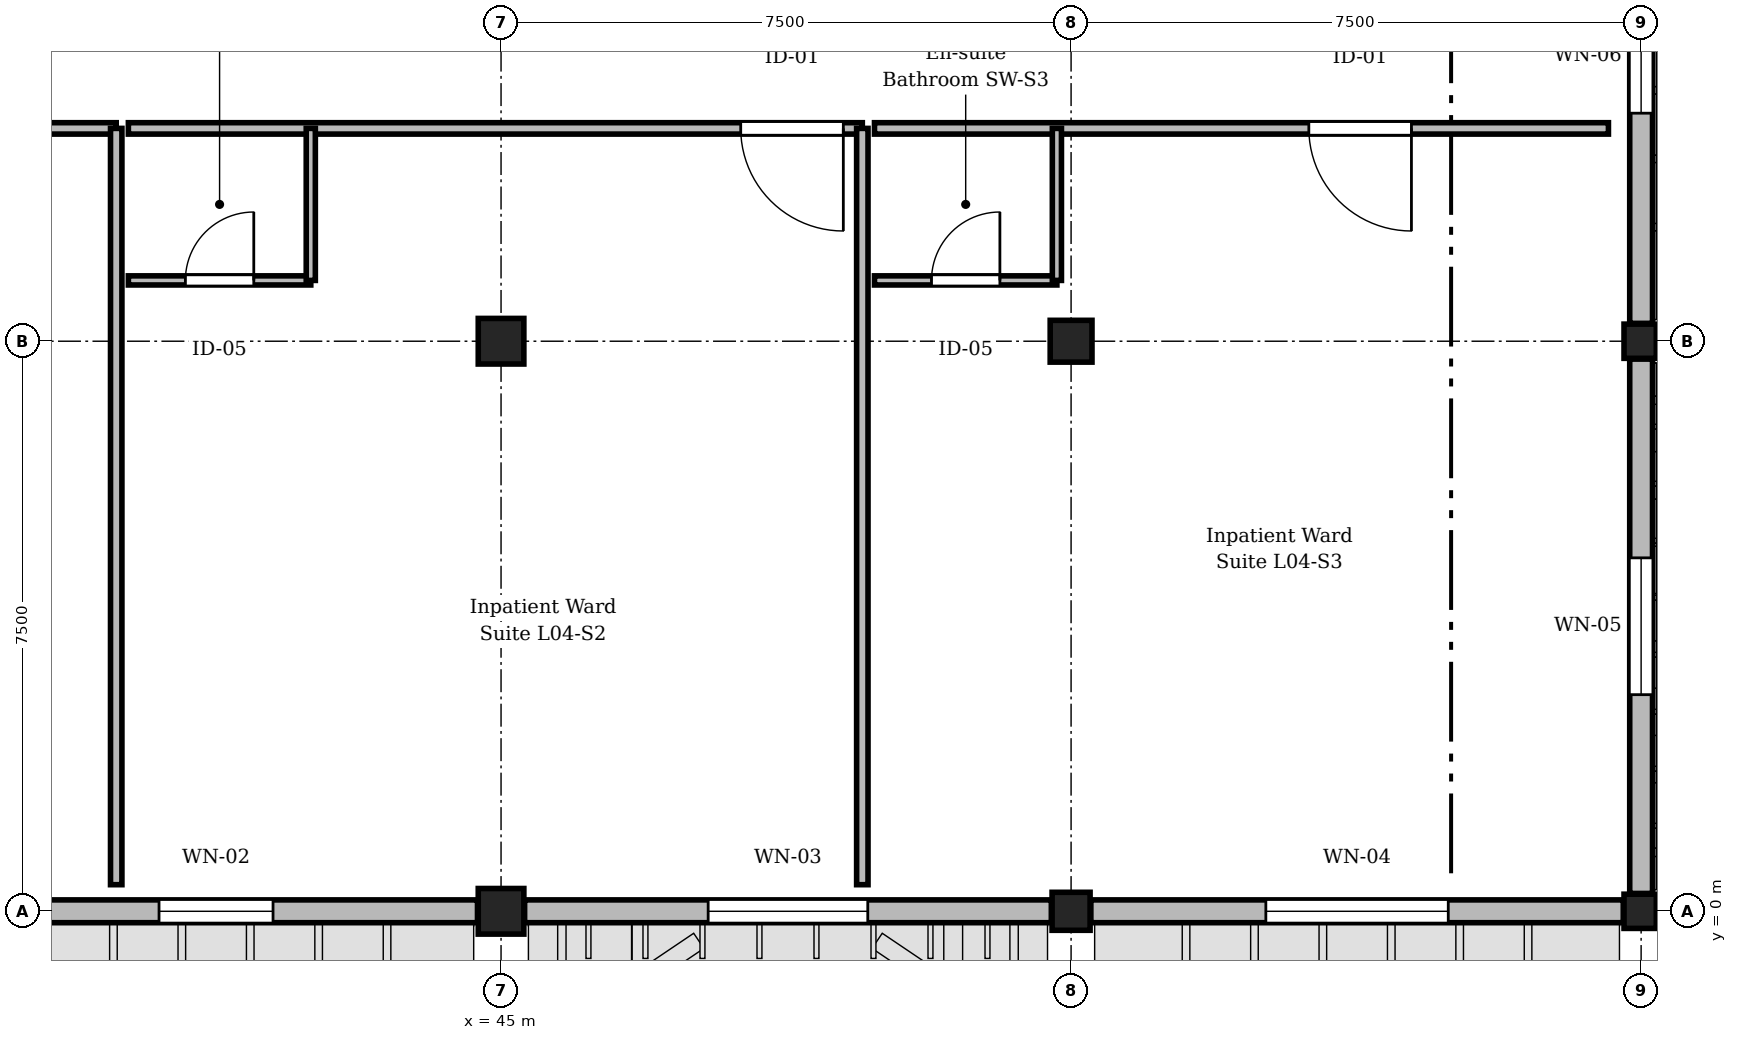
"""IFC4 building model, lengths in metres.
Left out: names, types, materials, properties, quantities, classifications, styles, units other than length and angle.
Written with IfcOpenShell. Run it as: python <this file> out.ifc"""

import sys

from ifc_helpers import new_model, si_unit, direction, frame, frame_2d, origin, origin_2d, place, context, subcontext, project, spatial, rectangle, circle, extrude, element, fill, save


model = new_model("IFC4")
c1 = context("Model", 3, precision=1e-05, world=origin(), true_north=direction((0.0, 1.0)))
c2 = subcontext(c1, "Body", "Model", "MODEL_VIEW")
j1 = project(units=[si_unit("LENGTHUNIT", "METRE"), si_unit("PLANEANGLEUNIT", "RADIAN")], contexts=[c1])
p1 = place(None, origin())
s1 = spatial("IfcSite", under=j1, at=p1, CompositionType="ELEMENT")
p2 = place(p1, origin())
s2 = spatial("IfcBuilding", under=s1, at=p2, CompositionType="ELEMENT")
p3 = place(p2, frame((0.0, 0.0, 17.85)))
s3 = spatial("IfcBuildingStorey", under=s2, at=p3, CompositionType="ELEMENT", Elevation=17.85)
p4 = place(p3, frame((45.0, 0.0, 0.0), z_axis=(0.0, 0.0, 1.0), x_axis=(1.0, 0.0, 0.0)))
e1 = element("IfcColumn", 1, at=p4, inside=s3, PredefinedType="COLUMN", context=c2, shape_type="SweptSolid", body=[
    extrude(circle(Radius=0.3, at=origin_2d()), origin(), (0.0, 0.0, 1.0), 4.05),
])
p5 = place(p3, frame((45.0, 7.5, 0.0), z_axis=(0.0, 0.0, 1.0), x_axis=(1.0, 0.0, 0.0)))
e2 = element("IfcColumn", 2, at=p5, inside=s3, PredefinedType="COLUMN", context=c2, shape_type="SweptSolid", body=[
    extrude(rectangle(XDim=0.6, YDim=0.6, at=origin_2d()), origin(), (0.0, 0.0, 1.0), 4.05),
])
p6 = place(p3, frame((52.5, 0.0, 0.0), z_axis=(0.0, 0.0, 1.0), x_axis=(1.0, 0.0, 0.0)))
e3 = element("IfcColumn", 3, at=p6, inside=s3, PredefinedType="COLUMN", context=c2, shape_type="SweptSolid", body=[
    extrude(rectangle(XDim=0.5, YDim=0.5, at=origin_2d()), origin(), (0.0, 0.0, 1.0), 4.05),
])
p7 = place(p3, frame((52.5, 7.5, 0.0), z_axis=(0.0, 0.0, 1.0), x_axis=(1.0, 0.0, 0.0)))
e4 = element("IfcColumn", 4, at=p7, inside=s3, PredefinedType="COLUMN", context=c2, shape_type="SweptSolid", body=[
    extrude(rectangle(XDim=0.55, YDim=0.55, at=origin_2d()), origin(), (0.0, 0.0, 1.0), 4.05),
])
for number, where, z_axis, x_axis in (
    (5, (60.0, 0.0, 0.0), (0.0, 0.0, 1.0), (1.0, 0.0, 0.0)),
    (6, (60.0, 7.5, 0.0), (0.0, 0.0, 1.0), (1.0, 0.0, 0.0)),
):
    element("IfcColumn", number, at=place(p3, frame(where, z_axis=z_axis, x_axis=x_axis)), inside=s3, PredefinedType="COLUMN", context=c2, shape_type="SweptSolid", body=[
        extrude(rectangle(XDim=0.45, YDim=0.45, at=origin_2d()), origin(), (0.0, 0.0, 1.0), 4.05),
    ])
p8 = place(p3, frame((44.69, 0.0, 0.0), z_axis=(0.0, 0.0, 1.0), x_axis=(-1.0, 0.0, 0.0)))
e7 = element("IfcWall", 7, at=p8, inside=s3, PredefinedType="STANDARD", context=c2, shape_type="SweptSolid", body=[
    extrude(rectangle(XDim=6.88, YDim=0.3, at=frame_2d((3.44, 0.0))), origin(), (0.0, 0.0, 1.0), 3.17),
])
p9 = place(p8, frame((2.69, 0.0, 0.9)))
e8 = element("IfcOpeningElement", 8, at=p9, cuts=e7, PredefinedType="OPENING", context=c2, shape_type="SweptSolid", body=[
    extrude(rectangle(XDim=1.5, YDim=1.99, at=frame_2d((0.75, 0.995))), frame((0.0, 0.16, 0.0), z_axis=(0.0, -1.0, 0.0), x_axis=(1.0, 0.0, 0.0)), (0.0, 0.0, 1.0), 0.32),
])
p10 = place(p3, frame((52.24, 0.0, 0.0), z_axis=(0.0, 0.0, 1.0), x_axis=(-1.0, 0.0, 0.0)))
e9 = element("IfcWall", 9, at=p10, inside=s3, PredefinedType="STANDARD", context=c2, shape_type="SweptSolid", body=[
    extrude(rectangle(XDim=6.93, YDim=0.3, at=frame_2d((3.465, 0.0))), origin(), (0.0, 0.0, 1.0), 3.17),
])
p11 = place(p10, frame((2.415, 0.0, 0.9)))
e10 = element("IfcOpeningElement", 10, at=p11, cuts=e9, PredefinedType="OPENING", context=c2, shape_type="SweptSolid", body=[
    extrude(rectangle(XDim=2.1, YDim=1.99, at=frame_2d((1.05, 0.995))), frame((0.0, 0.16, 0.0), z_axis=(0.0, -1.0, 0.0), x_axis=(1.0, 0.0, 0.0)), (0.0, 0.0, 1.0), 0.32),
])
p12 = place(p3, frame((59.765, 0.0, 0.0), z_axis=(0.0, 0.0, 1.0), x_axis=(-1.0, 0.0, 0.0)))
e11 = element("IfcWall", 11, at=p12, inside=s3, PredefinedType="STANDARD", context=c2, shape_type="SweptSolid", body=[
    extrude(rectangle(XDim=7.005, YDim=0.3, at=frame_2d((3.502, 0.0))), origin(), (0.0, 0.0, 1.0), 3.17),
])
p13 = place(p12, frame((2.302, 0.0, 0.9)))
e12 = element("IfcOpeningElement", 12, at=p13, cuts=e11, PredefinedType="OPENING", context=c2, shape_type="SweptSolid", body=[
    extrude(rectangle(XDim=2.4, YDim=1.99, at=frame_2d((1.2, 0.995))), frame((0.0, 0.16, 0.0), z_axis=(0.0, -1.0, 0.0), x_axis=(1.0, 0.0, 0.0)), (0.0, 0.0, 1.0), 0.32),
])
p14 = place(p3, frame((60.0, 7.265, 0.0), z_axis=(0.0, 0.0, 1.0), x_axis=(0.0, -1.0, 0.0)))
e13 = element("IfcWall", 13, at=p14, inside=s3, PredefinedType="STANDARD", context=c2, shape_type="SweptSolid", body=[
    extrude(rectangle(XDim=7.03, YDim=0.3, at=frame_2d((3.515, 0.0))), origin(), (0.0, 0.0, 1.0), 3.17),
])
p15 = place(p14, frame((2.615, 0.0, 0.9)))
e14 = element("IfcOpeningElement", 14, at=p15, cuts=e13, PredefinedType="OPENING", context=c2, shape_type="SweptSolid", body=[
    extrude(rectangle(XDim=1.8, YDim=1.99, at=frame_2d((0.9, 0.995))), frame((0.0, 0.16, 0.0), z_axis=(0.0, -1.0, 0.0), x_axis=(1.0, 0.0, 0.0)), (0.0, 0.0, 1.0), 0.32),
])
p16 = place(p3, frame((60.0, 14.765, 0.0), z_axis=(0.0, 0.0, 1.0), x_axis=(0.0, -1.0, 0.0)))
e15 = element("IfcWall", 15, at=p16, inside=s3, PredefinedType="STANDARD", context=c2, shape_type="SweptSolid", body=[
    extrude(rectangle(XDim=7.03, YDim=0.3, at=frame_2d((3.515, 0.0))), origin(), (0.0, 0.0, 1.0), 3.17),
])
p17 = place(p16, frame((2.765, 0.0, 0.9)))
e16 = element("IfcOpeningElement", 16, at=p17, cuts=e15, PredefinedType="OPENING", context=c2, shape_type="SweptSolid", body=[
    extrude(rectangle(XDim=1.5, YDim=1.99, at=frame_2d((0.75, 0.995))), frame((0.0, 0.16, 0.0), z_axis=(0.0, -1.0, 0.0), x_axis=(1.0, 0.0, 0.0)), (0.0, 0.0, 1.0), 0.32),
])
p18 = place(p3, frame((39.937, 10.3, 0.0), z_axis=(0.0, 0.0, 1.0), x_axis=(-1.0, 0.0, 0.0)))
e17 = element("IfcWall", 17, at=p18, inside=s3, PredefinedType="PARTITIONING", context=c2, shape_type="SweptSolid", body=[
    extrude(rectangle(XDim=9.657, YDim=0.15, at=frame_2d((4.828, 0.0))), origin(), (0.0, 0.0, 1.0), 3.755),
])
p19 = place(p18, frame((4.934, 0.0, 0.0)))
e18 = element("IfcOpeningElement", 18, at=p19, cuts=e17, PredefinedType="OPENING", context=c2, shape_type="SweptSolid", body=[
    extrude(rectangle(XDim=1.35, YDim=2.25, at=frame_2d((0.675, 1.125))), frame((0.0, 0.085, 0.0), z_axis=(0.0, -1.0, 0.0), x_axis=(1.0, 0.0, 0.0)), (0.0, 0.0, 1.0), 0.17),
])
p20 = place(p3, frame((49.753, 10.3, 0.0), z_axis=(0.0, 0.0, 1.0), x_axis=(-1.0, 0.0, 0.0)))
e19 = element("IfcWall", 19, at=p20, inside=s3, PredefinedType="PARTITIONING", context=c2, shape_type="SweptSolid", body=[
    extrude(rectangle(XDim=9.657, YDim=0.15, at=frame_2d((4.828, 0.0))), origin(), (0.0, 0.0, 1.0), 3.755),
])
p21 = place(p20, frame((0.25, 0.0, 0.0)))
e20 = element("IfcOpeningElement", 20, at=p21, cuts=e19, PredefinedType="OPENING", context=c2, shape_type="SweptSolid", body=[
    extrude(rectangle(XDim=1.35, YDim=2.25, at=frame_2d((0.675, 1.125))), frame((0.0, 0.085, 0.0), z_axis=(0.0, -1.0, 0.0), x_axis=(1.0, 0.0, 0.0)), (0.0, 0.0, 1.0), 0.17),
])
p22 = place(p3, frame((40.097, 8.3, 0.0), z_axis=(0.0, 0.0, 1.0), x_axis=(1.0, 0.0, 0.0)))
e21 = element("IfcWall", 21, at=p22, inside=s3, PredefinedType="PARTITIONING", context=c2, shape_type="SweptSolid", body=[
    extrude(rectangle(XDim=2.4, YDim=0.12, at=frame_2d((1.2, 0.0))), origin(), (0.0, 0.0, 1.0), 3.755),
])
p23 = place(p22, frame((0.75, 0.0, 0.0)))
e22 = element("IfcOpeningElement", 22, at=p23, cuts=e21, PredefinedType="OPENING", context=c2, shape_type="SweptSolid", body=[
    extrude(rectangle(XDim=0.9, YDim=2.1, at=frame_2d((0.45, 1.05))), frame((0.0, 0.07, 0.0), z_axis=(0.0, -1.0, 0.0), x_axis=(1.0, 0.0, 0.0)), (0.0, 0.0, 1.0), 0.14),
])
p24 = place(p3, frame((42.497, 8.3, 0.0), z_axis=(0.0, 0.0, 1.0), x_axis=(0.0, 1.0, 0.0)))
e23 = element("IfcWall", 23, at=p24, inside=s3, PredefinedType="PARTITIONING", context=c2, shape_type="SweptSolid", body=[
    extrude(rectangle(XDim=2.0, YDim=0.12, at=frame_2d((1.0, 0.0))), origin(), (0.0, 0.0, 1.0), 3.755),
])
p25 = place(p3, frame((59.57, 10.3, 0.0), z_axis=(0.0, 0.0, 1.0), x_axis=(-1.0, 0.0, 0.0)))
e24 = element("IfcWall", 24, at=p25, inside=s3, PredefinedType="PARTITIONING", context=c2, shape_type="SweptSolid", body=[
    extrude(rectangle(XDim=9.657, YDim=0.15, at=frame_2d((4.828, 0.0))), origin(), (0.0, 0.0, 1.0), 3.755),
])
p26 = place(p25, frame((2.592, 0.0, 0.0)))
e25 = element("IfcOpeningElement", 25, at=p26, cuts=e24, PredefinedType="OPENING", context=c2, shape_type="SweptSolid", body=[
    extrude(rectangle(XDim=1.35, YDim=2.25, at=frame_2d((0.675, 1.125))), frame((0.0, 0.085, 0.0), z_axis=(0.0, -1.0, 0.0), x_axis=(1.0, 0.0, 0.0)), (0.0, 0.0, 1.0), 0.17),
])
p27 = place(p3, frame((49.913, 8.3, 0.0), z_axis=(0.0, 0.0, 1.0), x_axis=(1.0, 0.0, 0.0)))
e26 = element("IfcWall", 26, at=p27, inside=s3, PredefinedType="PARTITIONING", context=c2, shape_type="SweptSolid", body=[
    extrude(rectangle(XDim=2.4, YDim=0.12, at=frame_2d((1.2, 0.0))), origin(), (0.0, 0.0, 1.0), 3.755),
])
p28 = place(p27, frame((0.75, 0.0, 0.0)))
e27 = element("IfcOpeningElement", 27, at=p28, cuts=e26, PredefinedType="OPENING", context=c2, shape_type="SweptSolid", body=[
    extrude(rectangle(XDim=0.9, YDim=2.1, at=frame_2d((0.45, 1.05))), frame((0.0, 0.07, 0.0), z_axis=(0.0, -1.0, 0.0), x_axis=(1.0, 0.0, 0.0)), (0.0, 0.0, 1.0), 0.14),
])
p29 = place(p3, frame((52.313, 8.3, 0.0), z_axis=(0.0, 0.0, 1.0), x_axis=(0.0, 1.0, 0.0)))
e28 = element("IfcWall", 28, at=p29, inside=s3, PredefinedType="PARTITIONING", context=c2, shape_type="SweptSolid", body=[
    extrude(rectangle(XDim=2.0, YDim=0.12, at=frame_2d((1.0, 0.0))), origin(), (0.0, 0.0, 1.0), 3.205),
])
for number, where, z_axis, x_axis in (
    (29, (39.937, 0.35, 0.0), (0.0, 0.0, 1.0), (0.0, 1.0, 0.0)),
    (30, (49.753, 0.35, 0.0), (0.0, 0.0, 1.0), (0.0, 1.0, 0.0)),
):
    element("IfcWall", number, at=place(p3, frame(where, z_axis=z_axis, x_axis=x_axis)), inside=s3, PredefinedType="PARTITIONING", context=c2, shape_type="SweptSolid", body=[
        extrude(rectangle(XDim=9.95, YDim=0.15, at=frame_2d((4.975, 0.0))), origin(), (0.0, 0.0, 1.0), 3.755),
    ])
p30 = place(p9, origin())
e31 = element("IfcWindow", 31, at=p30, inside=s3, PartitioningType="SINGLE_PANEL", PredefinedType="WINDOW", context=c2, shape_type="SweptSolid", body=[
    extrude(rectangle(XDim=1.5, YDim=1.99, at=frame_2d((0.75, 0.995))), frame((0.0, 0.03, 0.0), z_axis=(0.0, -1.0, 0.0), x_axis=(1.0, 0.0, 0.0)), (0.0, 0.0, 1.0), 0.06),
])
fill(e8, e31)
p31 = place(p11, origin())
e32 = element("IfcWindow", 32, at=p31, inside=s3, PartitioningType="SINGLE_PANEL", PredefinedType="WINDOW", context=c2, shape_type="SweptSolid", body=[
    extrude(rectangle(XDim=2.1, YDim=1.99, at=frame_2d((1.05, 0.995))), frame((0.0, 0.03, 0.0), z_axis=(0.0, -1.0, 0.0), x_axis=(1.0, 0.0, 0.0)), (0.0, 0.0, 1.0), 0.06),
])
fill(e10, e32)
p32 = place(p13, origin())
e33 = element("IfcWindow", 33, at=p32, inside=s3, PartitioningType="SINGLE_PANEL", PredefinedType="WINDOW", context=c2, shape_type="SweptSolid", body=[
    extrude(rectangle(XDim=2.4, YDim=1.99, at=frame_2d((1.2, 0.995))), frame((0.0, 0.03, 0.0), z_axis=(0.0, -1.0, 0.0), x_axis=(1.0, 0.0, 0.0)), (0.0, 0.0, 1.0), 0.06),
])
fill(e12, e33)
p33 = place(p15, origin())
e34 = element("IfcWindow", 34, at=p33, inside=s3, PartitioningType="SINGLE_PANEL", PredefinedType="WINDOW", context=c2, shape_type="SweptSolid", body=[
    extrude(rectangle(XDim=1.8, YDim=1.99, at=frame_2d((0.9, 0.995))), frame((0.0, 0.03, 0.0), z_axis=(0.0, -1.0, 0.0), x_axis=(1.0, 0.0, 0.0)), (0.0, 0.0, 1.0), 0.06),
])
fill(e14, e34)
p34 = place(p17, origin())
e35 = element("IfcWindow", 35, at=p34, inside=s3, PartitioningType="SINGLE_PANEL", PredefinedType="WINDOW", context=c2, shape_type="SweptSolid", body=[
    extrude(rectangle(XDim=1.5, YDim=1.99, at=frame_2d((0.75, 0.995))), frame((0.0, 0.03, 0.0), z_axis=(0.0, -1.0, 0.0), x_axis=(1.0, 0.0, 0.0)), (0.0, 0.0, 1.0), 0.06),
])
fill(e16, e35)
p35 = place(p21, origin())
e36 = element("IfcDoor", 36, at=p35, inside=s3, OperationType="SINGLE_SWING_LEFT", PredefinedType="DOOR", context=c2, shape_type="SweptSolid", body=[
    extrude(rectangle(XDim=1.35, YDim=2.25, at=frame_2d((0.675, 1.125))), frame((0.0, 0.025, 0.0), z_axis=(0.0, -1.0, 0.0), x_axis=(1.0, 0.0, 0.0)), (0.0, 0.0, 1.0), 0.05),
])
fill(e20, e36)
p36 = place(p23, origin())
e37 = element("IfcDoor", 37, at=p36, inside=s3, OperationType="SINGLE_SWING_RIGHT", PredefinedType="DOOR", context=c2, shape_type="SweptSolid", body=[
    extrude(rectangle(XDim=0.9, YDim=2.1, at=frame_2d((0.45, 1.05))), frame((0.0, 0.025, 0.0), z_axis=(0.0, -1.0, 0.0), x_axis=(1.0, 0.0, 0.0)), (0.0, 0.0, 1.0), 0.05),
])
fill(e22, e37)
p37 = place(p26, origin())
e38 = element("IfcDoor", 38, at=p37, inside=s3, OperationType="SINGLE_SWING_LEFT", PredefinedType="DOOR", context=c2, shape_type="SweptSolid", body=[
    extrude(rectangle(XDim=1.35, YDim=2.25, at=frame_2d((0.675, 1.125))), frame((0.0, 0.025, 0.0), z_axis=(0.0, -1.0, 0.0), x_axis=(1.0, 0.0, 0.0)), (0.0, 0.0, 1.0), 0.05),
])
fill(e25, e38)
p38 = place(p28, origin())
e39 = element("IfcDoor", 39, at=p38, inside=s3, OperationType="SINGLE_SWING_RIGHT", PredefinedType="DOOR", context=c2, shape_type="SweptSolid", body=[
    extrude(rectangle(XDim=0.9, YDim=2.1, at=frame_2d((0.45, 1.05))), frame((0.0, 0.025, 0.0), z_axis=(0.0, -1.0, 0.0), x_axis=(1.0, 0.0, 0.0)), (0.0, 0.0, 1.0), 0.05),
])
fill(e27, e39)
save(model, sys.argv[1])
